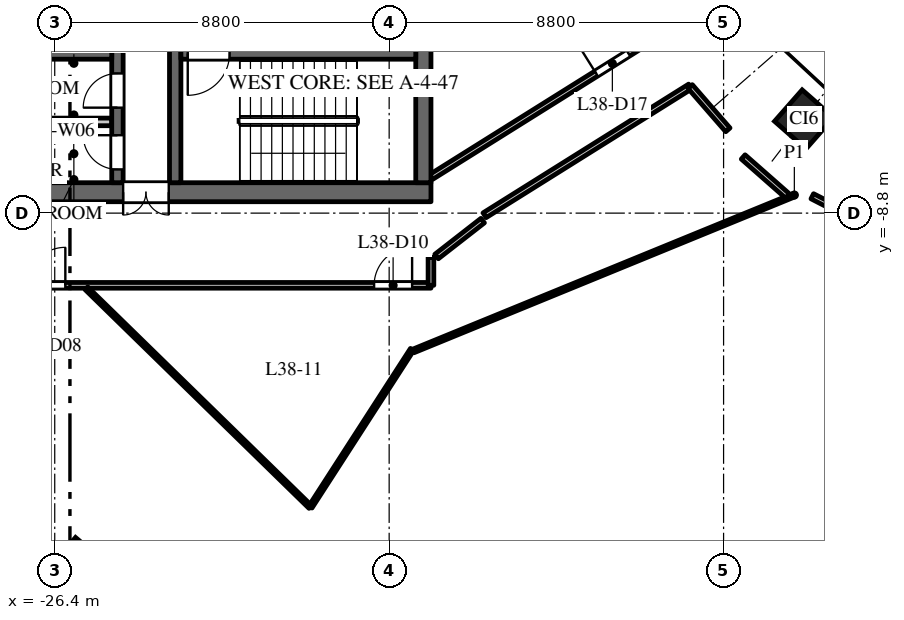
"""IFC4 building model, lengths in metres.
Left out: names, types, materials, properties, quantities, classifications, styles, units other than length and angle.
Written with IfcOpenShell. Run it as: python <this file> out.ifc"""

import sys

from ifc_helpers import new_model, si_unit, direction, frame, frame_2d, origin, origin_2d, place, context, subcontext, project, spatial, rectangle, extrude, element, fill, save


model = new_model("IFC4")
c1 = context("Model", 3, precision=1e-05, world=origin(), true_north=direction((0.0, 1.0)))
c2 = subcontext(c1, "Body", "Model", "MODEL_VIEW")
j1 = project(units=[si_unit("LENGTHUNIT", "METRE"), si_unit("PLANEANGLEUNIT", "RADIAN")], contexts=[c1])
p1 = place(None, origin())
s1 = spatial("IfcSite", under=j1, at=p1, CompositionType="ELEMENT")
p2 = place(p1, origin())
s2 = spatial("IfcBuilding", under=s1, at=p2, CompositionType="ELEMENT")
p3 = place(p2, frame((0.0, 0.0, 166.0)))
s3 = spatial("IfcBuildingStorey", under=s2, at=p3, CompositionType="ELEMENT", Elevation=166.0)
p4 = place(p3, frame((-25.783, -18.18, 0.0), z_axis=(0.0, 0.0, 1.0), x_axis=(0.763035199656, -0.646356932419, 0.0)))
e1 = element("IfcColumn", 1, at=p4, inside=s3, PredefinedType="COLUMN", context=c2, shape_type="SweptSolid", body=[
    extrude(rectangle(XDim=1.2, YDim=1.2, at=origin_2d()), origin(), (0.0, 0.0, 1.0), 4.0),
])
p5 = place(p3, frame((-6.682, -6.334, 0.0), z_axis=(0.0, 0.0, 1.0), x_axis=(0.75102249095, -0.660276622399, 0.0)))
e2 = element("IfcColumn", 2, at=p5, inside=s3, PredefinedType="COLUMN", context=c2, shape_type="SweptSolid", body=[
    extrude(rectangle(XDim=1.1, YDim=1.1, at=origin_2d()), origin(), (0.0, 0.0, 1.0), 4.0),
])
p6 = place(p3, frame((-16.5, -8.25, 0.0), z_axis=(0.0, 0.0, 1.0), x_axis=(-1.0, 0.0, 0.0)))
e3 = element("IfcWall", 3, at=p6, inside=s3, PredefinedType="SHEAR", context=c2, shape_type="SweptSolid", body=[
    extrude(rectangle(XDim=15.0, YDim=0.5, at=frame_2d((7.5, 0.0))), origin(), (0.0, 0.0, 1.0), 3.7),
])
p7 = place(p6, frame((6.9, 0.0, 0.0)))
e4 = element("IfcOpeningElement", 4, at=p7, cuts=e3, PredefinedType="OPENING", context=c2, shape_type="SweptSolid", body=[
    extrude(rectangle(XDim=1.2, YDim=2.1, at=frame_2d((0.6, 1.05))), frame((0.0, 0.26, 0.0), z_axis=(0.0, -1.0, 0.0), x_axis=(1.0, 0.0, 0.0)), (0.0, 0.0, 1.0), 0.52),
])
p8 = place(p6, frame((12.275, 0.0, 0.0)))
e5 = element("IfcOpeningElement", 5, at=p8, cuts=e3, PredefinedType="OPENING", context=c2, shape_type="SweptSolid", body=[
    extrude(rectangle(XDim=0.9, YDim=2.1, at=frame_2d((0.45, 1.05))), frame((0.0, 0.26, 0.0), z_axis=(0.0, -1.0, 0.0), x_axis=(1.0, 0.0, 0.0)), (0.0, 0.0, 1.0), 0.52),
])
p9 = place(p3, frame((-24.75, -8.0, 0.0), z_axis=(0.0, 0.0, 1.0), x_axis=(0.0, 1.0, 0.0)))
e6 = element("IfcWall", 6, at=p9, inside=s3, PredefinedType="SHEAR", context=c2, shape_type="SweptSolid", body=[
    extrude(rectangle(XDim=16.0, YDim=0.3, at=frame_2d((8.0, 0.0))), origin(), (0.0, 0.0, 1.0), 3.7),
])
p10 = place(p9, frame((4.425, 0.0, 0.0)))
e7 = element("IfcOpeningElement", 7, at=p10, cuts=e6, PredefinedType="OPENING", context=c2, shape_type="SweptSolid", body=[
    extrude(rectangle(XDim=1.1, YDim=2.1, at=frame_2d((0.55, 1.05))), frame((0.0, 0.16, 0.0), z_axis=(0.0, -1.0, 0.0), x_axis=(1.0, 0.0, 0.0)), (0.0, 0.0, 1.0), 0.32),
])
p11 = place(p9, frame((7.45, 0.0, 0.0)))
e8 = element("IfcOpeningElement", 8, at=p11, cuts=e6, PredefinedType="OPENING", context=c2, shape_type="SweptSolid", body=[
    extrude(rectangle(XDim=1.1, YDim=2.1, at=frame_2d((0.55, 1.05))), frame((0.0, 0.16, 0.0), z_axis=(0.0, -1.0, 0.0), x_axis=(1.0, 0.0, 0.0)), (0.0, 0.0, 1.0), 0.32),
])
p12 = place(p9, frame((10.475, 0.0, 0.0)))
e9 = element("IfcOpeningElement", 9, at=p12, cuts=e6, PredefinedType="OPENING", context=c2, shape_type="SweptSolid", body=[
    extrude(rectangle(XDim=1.1, YDim=2.1, at=frame_2d((0.55, 1.05))), frame((0.0, 0.16, 0.0), z_axis=(0.0, -1.0, 0.0), x_axis=(1.0, 0.0, 0.0)), (0.0, 0.0, 1.0), 0.32),
])
p13 = place(p9, frame((13.75, 0.0, 0.0)))
e10 = element("IfcOpeningElement", 10, at=p13, cuts=e6, PredefinedType="OPENING", context=c2, shape_type="SweptSolid", body=[
    extrude(rectangle(XDim=0.9, YDim=2.1, at=frame_2d((0.45, 1.05))), frame((0.0, 0.16, 0.0), z_axis=(0.0, -1.0, 0.0), x_axis=(1.0, 0.0, 0.0)), (0.0, 0.0, 1.0), 0.32),
])
p14 = place(p9, frame((1.975, 0.0, 0.0)))
e11 = element("IfcOpeningElement", 11, at=p14, cuts=e6, PredefinedType="OPENING", context=c2, shape_type="SweptSolid", body=[
    extrude(rectangle(XDim=0.9, YDim=2.1, at=frame_2d((0.45, 1.05))), frame((0.0, 0.16, 0.0), z_axis=(0.0, -1.0, 0.0), x_axis=(1.0, 0.0, 0.0)), (0.0, 0.0, 1.0), 0.32),
])
p15 = place(p9, frame((0.35, 0.0, 0.0)))
e12 = element("IfcOpeningElement", 12, at=p15, cuts=e6, PredefinedType="OPENING", context=c2, shape_type="SweptSolid", body=[
    extrude(rectangle(XDim=0.9, YDim=2.1, at=frame_2d((0.45, 1.05))), frame((0.0, 0.16, 0.0), z_axis=(0.0, -1.0, 0.0), x_axis=(1.0, 0.0, 0.0)), (0.0, 0.0, 1.0), 0.32),
])
p16 = place(p3, frame((-16.7, -8.0, 0.0), z_axis=(0.0, 0.0, 1.0), x_axis=(0.0, 1.0, 0.0)))
e13 = element("IfcWall", 13, at=p16, inside=s3, PredefinedType="SHEAR", context=c2, shape_type="SweptSolid", body=[
    extrude(rectangle(XDim=16.0, YDim=0.4, at=frame_2d((8.0, 0.0))), origin(), (0.0, 0.0, 1.0), 3.7),
])
p17 = place(p3, frame((-24.9, -6.4, 0.0), z_axis=(0.0, 0.0, 1.0), x_axis=(-1.0, 0.0, 0.0)))
e14 = element("IfcWall", 14, at=p17, inside=s3, PredefinedType="PARTITIONING", context=c2, shape_type="SweptSolid", body=[
    extrude(rectangle(XDim=2.35, YDim=0.2, at=frame_2d((1.175, 0.0))), origin(), (0.0, 0.0, 1.0), 3.7),
])
p18 = place(p3, frame((-24.9, -4.6, 0.0), z_axis=(0.0, 0.0, 1.0), x_axis=(-1.0, 0.0, 0.0)))
e15 = element("IfcWall", 15, at=p18, inside=s3, PredefinedType="SHEAR", context=c2, shape_type="SweptSolid", body=[
    extrude(rectangle(XDim=6.1, YDim=0.3, at=frame_2d((3.05, 0.0))), origin(), (0.0, 0.0, 1.0), 3.7),
])
p19 = place(p3, frame((-23.23, -8.0, 0.0), z_axis=(0.0, 0.0, 1.0), x_axis=(0.0, 1.0, 0.0)))
e16 = element("IfcWall", 16, at=p19, inside=s3, PredefinedType="SHEAR", context=c2, shape_type="SweptSolid", body=[
    extrude(rectangle(XDim=7.875, YDim=0.3, at=frame_2d((3.938, 0.0))), origin(), (0.0, 0.0, 1.0), 3.7),
])
p20 = place(p19, frame((5.15, 0.0, 0.0)))
e17 = element("IfcOpeningElement", 17, at=p20, cuts=e16, PredefinedType="OPENING", context=c2, shape_type="SweptSolid", body=[
    extrude(rectangle(XDim=1.1, YDim=2.1, at=frame_2d((0.55, 1.05))), frame((0.0, 0.16, 0.0), z_axis=(0.0, -1.0, 0.0), x_axis=(1.0, 0.0, 0.0)), (0.0, 0.0, 1.0), 0.32),
])
p21 = place(p3, frame((-16.9, -4.6, 0.0), z_axis=(0.0, 0.0, 1.0), x_axis=(-1.0, 0.0, 0.0)))
e18 = element("IfcWall", 18, at=p21, inside=s3, PredefinedType="SHEAR", context=c2, shape_type="SweptSolid", body=[
    extrude(rectangle(XDim=6.18, YDim=0.3, at=frame_2d((3.09, 0.0))), origin(), (0.0, 0.0, 1.0), 3.7),
])
p22 = place(p21, frame((4.9, 0.0, 0.0)))
e19 = element("IfcOpeningElement", 19, at=p22, cuts=e18, PredefinedType="OPENING", context=c2, shape_type="SweptSolid", body=[
    extrude(rectangle(XDim=1.1, YDim=2.1, at=frame_2d((0.55, 1.05))), frame((0.0, 0.16, 0.0), z_axis=(0.0, -1.0, 0.0), x_axis=(1.0, 0.0, 0.0)), (0.0, 0.0, 1.0), 0.32),
])
p23 = place(p3, frame((-31.5, -10.7, 0.0), z_axis=(0.0, 0.0, 1.0), x_axis=(1.0, 0.0, 0.0)))
e20 = element("IfcWall", 20, at=p23, inside=s3, PredefinedType="PARTITIONING", context=c2, shape_type="SweptSolid", body=[
    extrude(rectangle(XDim=15.0, YDim=0.15, at=frame_2d((7.5, 0.0))), origin(), (0.0, 0.0, 1.0), 3.1),
])
p24 = place(p23, frame((4.379, 0.0, 0.0)))
e21 = element("IfcOpeningElement", 21, at=p24, cuts=e20, PredefinedType="OPENING", context=c2, shape_type="SweptSolid", body=[
    extrude(rectangle(XDim=1.0, YDim=2.1, at=frame_2d((0.5, 1.05))), frame((0.0, 0.085, 0.0), z_axis=(0.0, -1.0, 0.0), x_axis=(1.0, 0.0, 0.0)), (0.0, 0.0, 1.0), 0.17),
])
p25 = place(p23, frame((13.504, 0.0, 0.0)))
e22 = element("IfcOpeningElement", 22, at=p25, cuts=e20, PredefinedType="OPENING", context=c2, shape_type="SweptSolid", body=[
    extrude(rectangle(XDim=1.0, YDim=2.1, at=frame_2d((0.5, 1.05))), frame((0.0, 0.085, 0.0), z_axis=(0.0, -1.0, 0.0), x_axis=(1.0, 0.0, 0.0)), (0.0, 0.0, 1.0), 0.17),
])
p26 = place(p3, frame((-25.566, -10.778, 0.0), z_axis=(0.0, 0.0, 1.0), x_axis=(0.715430617602, -0.698683784982, 0.0)))
e23 = element("IfcWall", 23, at=p26, inside=s3, PredefinedType="PARTITIONING", context=c2, shape_type="SweptSolid", body=[
    extrude(rectangle(XDim=8.237, YDim=0.1, at=frame_2d((4.118, 0.0))), origin(), (0.0, 0.0, 1.0), 2.75),
])
p27 = place(p3, frame((-19.673, -16.533, 0.0), z_axis=(0.0, 0.0, 1.0), x_axis=(0.542297022656, 0.840186847801, 0.0)))
e24 = element("IfcWall", 24, at=p27, inside=s3, PredefinedType="PARTITIONING", context=c2, shape_type="SweptSolid", body=[
    extrude(rectangle(XDim=4.935, YDim=0.1, at=frame_2d((2.467, 0.0))), origin(), (0.0, 0.0, 1.0), 3.7),
])
p28 = place(p3, frame((-16.963, -12.427, 0.0), z_axis=(0.0, 0.0, 1.0), x_axis=(0.925484473487, 0.378785545308, 0.0)))
e25 = element("IfcWall", 25, at=p28, inside=s3, PredefinedType="PARTITIONING", context=c2, shape_type="SweptSolid", body=[
    extrude(rectangle(XDim=10.832, YDim=0.1, at=frame_2d((5.416, 0.0))), origin(), (0.0, 0.0, 1.0), 3.7),
])
p29 = place(p3, frame((-16.5, -10.7, 0.0), z_axis=(0.0, 0.0, 1.0), x_axis=(0.0, 1.0, 0.0)))
e26 = element("IfcWall", 26, at=p29, inside=s3, PredefinedType="PARTITIONING", context=c2, shape_type="SweptSolid", body=[
    extrude(rectangle(XDim=0.736, YDim=0.15, at=frame_2d((0.368, 0.0))), origin(), (0.0, 0.0, 1.0), 3.7),
])
p30 = place(p3, frame((-16.5, -7.851, 0.0), z_axis=(0.0, 0.0, 1.0), x_axis=(0.847690706888, 0.530490777917, 0.0)))
e27 = element("IfcWall", 27, at=p30, inside=s3, PredefinedType="PARTITIONING", context=c2, shape_type="SweptSolid", body=[
    extrude(rectangle(XDim=6.781, YDim=0.15, at=frame_2d((3.39, 0.0))), origin(), (0.0, 0.0, 1.0), 3.7),
])
p31 = place(p30, frame((5.131, 0.0, 0.0)))
e28 = element("IfcOpeningElement", 28, at=p31, cuts=e27, PredefinedType="OPENING", context=c2, shape_type="SweptSolid", body=[
    extrude(rectangle(XDim=1.0, YDim=2.1, at=frame_2d((0.5, 1.05))), frame((0.0, 0.085, 0.0), z_axis=(0.0, -1.0, 0.0), x_axis=(1.0, 0.0, 0.0)), (0.0, 0.0, 1.0), 0.17),
])
p32 = place(p3, frame((-15.089, -8.856, 0.0), z_axis=(0.0, 0.0, 1.0), x_axis=(0.847602682855, 0.530631408811, 0.0)))
e29 = element("IfcWall", 29, at=p32, inside=s3, PredefinedType="PARTITIONING", context=c2, shape_type="SweptSolid", body=[
    extrude(rectangle(XDim=6.383, YDim=0.15, at=frame_2d((3.191, 0.0))), origin(), (0.0, 0.0, 1.0), 3.7),
])
p33 = place(p3, frame((-9.679, -5.469, 0.0), z_axis=(0.0, 0.0, 1.0), x_axis=(0.656454677423, -0.75436546613, 0.0)))
e30 = element("IfcWall", 30, at=p33, inside=s3, PredefinedType="PARTITIONING", context=c2, shape_type="SweptSolid", body=[
    extrude(rectangle(XDim=1.511, YDim=0.15, at=frame_2d((0.755, 0.0))), origin(), (0.0, 0.0, 1.0), 2.75),
])
p34 = place(p3, frame((-8.284, -7.322, 0.0), z_axis=(0.0, 0.0, 1.0), x_axis=(0.750666784408, -0.660680996235, 0.0)))
e31 = element("IfcWall", 31, at=p34, inside=s3, PredefinedType="PARTITIONING", context=c2, shape_type="SweptSolid", body=[
    extrude(rectangle(XDim=1.555, YDim=0.15, at=frame_2d((0.777, 0.0))), origin(), (0.0, 0.0, 1.0), 3.7),
])
p35 = place(p3, frame((-6.466, -8.356, 0.0), z_axis=(0.0, 0.0, 1.0), x_axis=(0.889472002788, -0.456989667559, 0.0)))
e32 = element("IfcWall", 32, at=p35, inside=s3, PredefinedType="PARTITIONING", context=c2, shape_type="SweptSolid", body=[
    extrude(rectangle(XDim=1.355, YDim=0.15, at=frame_2d((0.677, 0.0))), origin(), (0.0, 0.0, 1.0), 3.7),
])
p36 = place(p3, frame((-15.139, -8.997, 0.0), z_axis=(0.0, 0.0, 1.0), x_axis=(-0.788950226826, -0.614457109643, 0.0)))
e33 = element("IfcWall", 33, at=p36, inside=s3, PredefinedType="PARTITIONING", context=c2, shape_type="SweptSolid", body=[
    extrude(rectangle(XDim=1.538, YDim=0.15, at=frame_2d((0.769, 0.0))), origin(), (0.0, 0.0, 1.0), 3.7),
])
p37 = place(p22, origin())
e34 = element("IfcDoor", 34, at=p37, inside=s3, OperationType="SINGLE_SWING_LEFT", PredefinedType="DOOR", context=c2, shape_type="SweptSolid", body=[
    extrude(rectangle(XDim=1.1, YDim=2.1, at=frame_2d((0.55, 1.05))), frame((0.0, 0.025, 0.0), z_axis=(0.0, -1.0, 0.0), x_axis=(1.0, 0.0, 0.0)), (0.0, 0.0, 1.0), 0.05),
])
fill(e19, e34)
p38 = place(p7, origin())
e35 = element("IfcDoor", 35, at=p38, inside=s3, OperationType="DOUBLE_DOOR_DOUBLE_SWING", PredefinedType="DOOR", context=c2, shape_type="SweptSolid", body=[
    extrude(rectangle(XDim=1.2, YDim=2.1, at=frame_2d((0.6, 1.05))), frame((0.0, 0.025, 0.0), z_axis=(0.0, -1.0, 0.0), x_axis=(1.0, 0.0, 0.0)), (0.0, 0.0, 1.0), 0.05),
])
fill(e4, e35)
p39 = place(p14, origin())
e36 = element("IfcDoor", 36, at=p39, inside=s3, OperationType="SINGLE_SWING_RIGHT", PredefinedType="DOOR", context=c2, shape_type="SweptSolid", body=[
    extrude(rectangle(XDim=0.9, YDim=2.1, at=frame_2d((0.45, 1.05))), frame((0.0, 0.025, 0.0), z_axis=(0.0, -1.0, 0.0), x_axis=(1.0, 0.0, 0.0)), (0.0, 0.0, 1.0), 0.05),
])
fill(e11, e36)
p40 = place(p15, origin())
e37 = element("IfcDoor", 37, at=p40, inside=s3, OperationType="SINGLE_SWING_LEFT", PredefinedType="DOOR", context=c2, shape_type="SweptSolid", body=[
    extrude(rectangle(XDim=0.9, YDim=2.1, at=frame_2d((0.45, 1.05))), frame((0.0, 0.025, 0.0), z_axis=(0.0, -1.0, 0.0), x_axis=(1.0, 0.0, 0.0)), (0.0, 0.0, 1.0), 0.05),
])
fill(e12, e37)
p41 = place(p24, origin())
e38 = element("IfcDoor", 38, at=p41, inside=s3, OperationType="SINGLE_SWING_RIGHT", PredefinedType="DOOR", context=c2, shape_type="SweptSolid", body=[
    extrude(rectangle(XDim=1.0, YDim=2.1, at=frame_2d((0.5, 1.05))), frame((0.0, 0.025, 0.0), z_axis=(0.0, -1.0, 0.0), x_axis=(1.0, 0.0, 0.0)), (0.0, 0.0, 1.0), 0.05),
])
fill(e21, e38)
p42 = place(p25, origin())
e39 = element("IfcDoor", 39, at=p42, inside=s3, OperationType="SINGLE_SWING_RIGHT", PredefinedType="DOOR", context=c2, shape_type="SweptSolid", body=[
    extrude(rectangle(XDim=1.0, YDim=2.1, at=frame_2d((0.5, 1.05))), frame((0.0, 0.025, 0.0), z_axis=(0.0, -1.0, 0.0), x_axis=(1.0, 0.0, 0.0)), (0.0, 0.0, 1.0), 0.05),
])
fill(e22, e39)
p43 = place(p31, origin())
e40 = element("IfcDoor", 40, at=p43, inside=s3, OperationType="SINGLE_SWING_LEFT", PredefinedType="DOOR", context=c2, shape_type="SweptSolid", body=[
    extrude(rectangle(XDim=1.0, YDim=2.1, at=frame_2d((0.5, 1.05))), frame((0.0, 0.025, 0.0), z_axis=(0.0, -1.0, 0.0), x_axis=(1.0, 0.0, 0.0)), (0.0, 0.0, 1.0), 0.05),
])
fill(e28, e40)
save(model, sys.argv[1])
